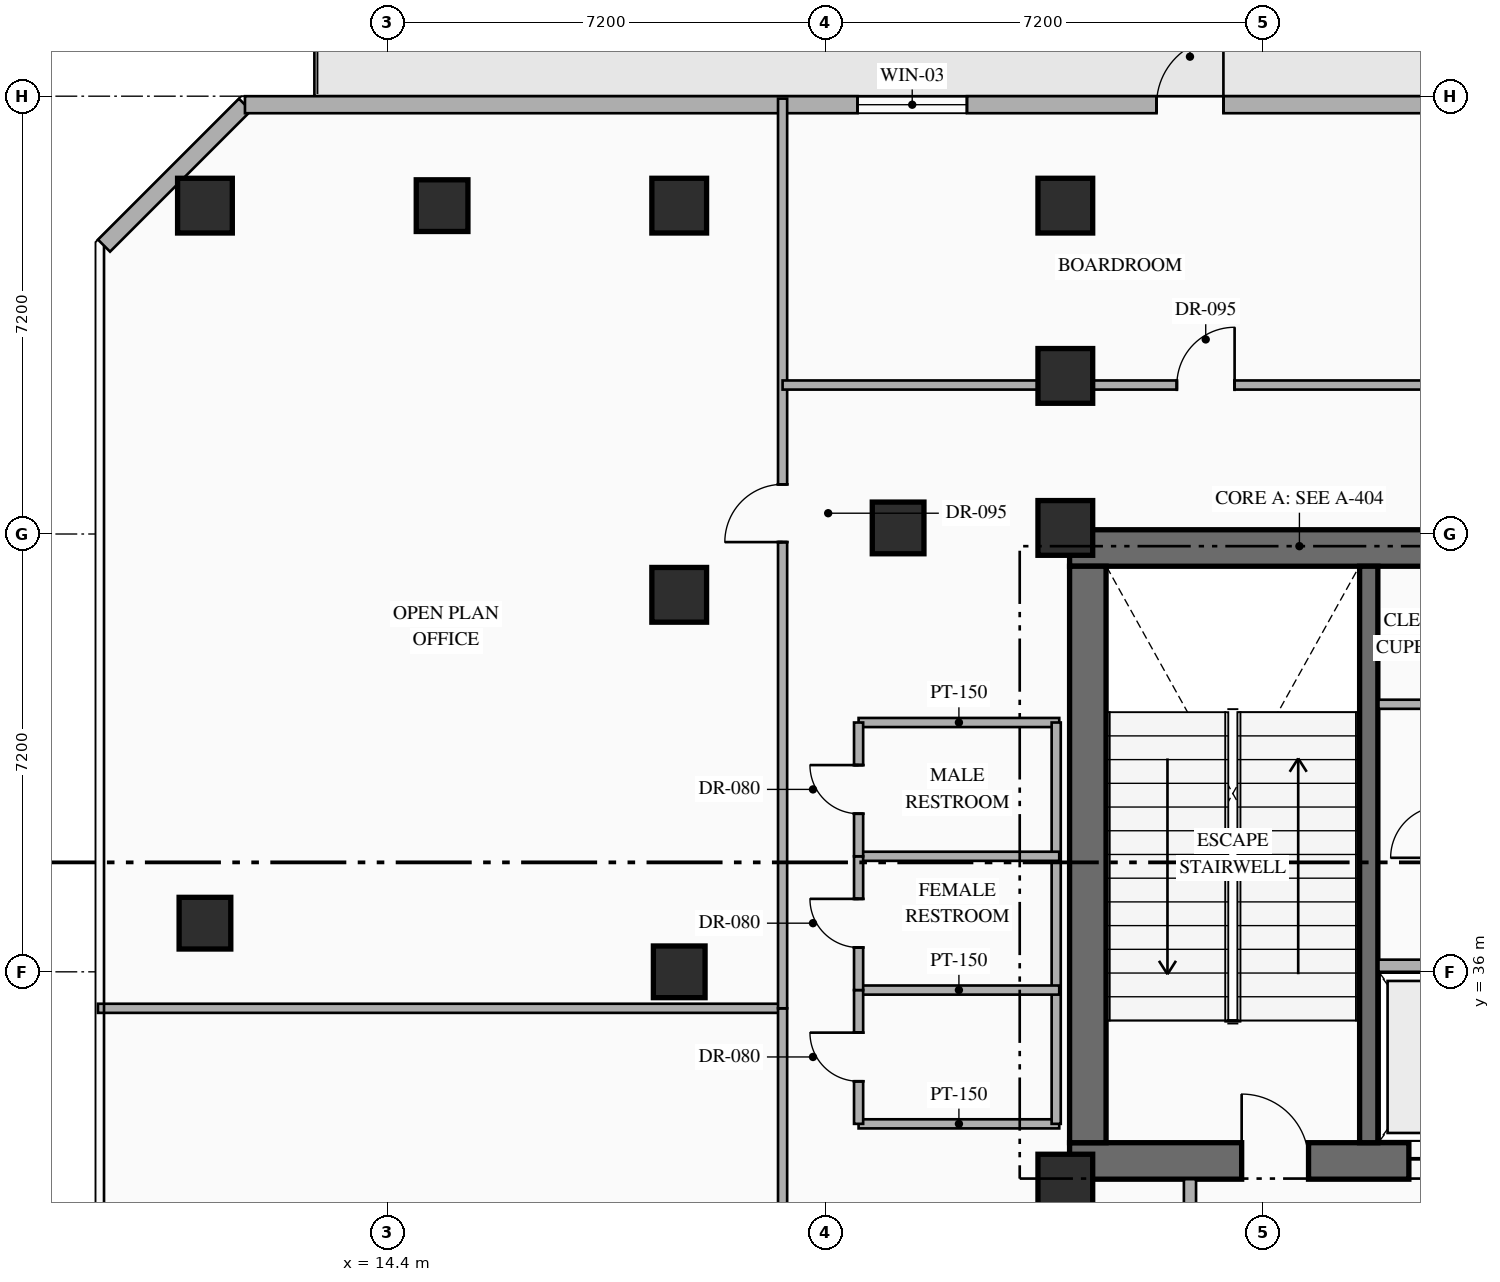
"""IFC4 building model, lengths in metres.
Left out: names, types, materials, properties, quantities, classifications, styles, units other than length and angle.
Written with IfcOpenShell. Run it as: python <this file> out.ifc"""

import sys

from ifc_helpers import new_model, si_unit, direction, frame, frame_2d, origin, origin_2d, place, context, subcontext, project, spatial, rectangle, hollow_rectangle, extrude, element, fill, save


model = new_model("IFC4")
c1 = context("Model", 3, precision=1e-05, world=origin(), true_north=direction((0.0, 1.0)))
c2 = subcontext(c1, "Body", "Model", "MODEL_VIEW")
j1 = project(units=[si_unit("LENGTHUNIT", "METRE"), si_unit("PLANEANGLEUNIT", "RADIAN")], contexts=[c1])
p1 = place(None, origin())
s1 = spatial("IfcSite", under=j1, at=p1, CompositionType="ELEMENT")
p2 = place(p1, origin())
s2 = spatial("IfcBuilding", under=s1, at=p2, CompositionType="ELEMENT")
p3 = place(p2, frame((0.0, 0.0, 96.45)))
s3 = spatial("IfcBuildingStorey", under=s2, at=p3, CompositionType="ELEMENT", Elevation=96.45)
p4 = place(p3, frame((25.62, 32.89, 0.0), z_axis=(0.0, 0.0, 1.0), x_axis=(1.0, 0.0, 0.0)))
e1 = element("IfcWall", 1, at=p4, inside=s3, PredefinedType="SHEAR", context=c2, shape_type="SweptSolid", body=[
    extrude(rectangle(XDim=7.78, YDim=0.6, at=frame_2d((3.89, 0.0))), origin(), (0.0, 0.0, 1.0), 4.8),
])
p5 = place(p4, frame((2.83, 0.0, 0.0)))
e2 = element("IfcOpeningElement", 2, at=p5, cuts=e1, PredefinedType="OPENING", context=c2, shape_type="SweptSolid", body=[
    extrude(rectangle(XDim=1.1, YDim=2.2, at=frame_2d((0.55, 1.1))), frame((0.0, 0.31, 0.0), z_axis=(0.0, -1.0, 0.0), x_axis=(1.0, 0.0, 0.0)), (0.0, 0.0, 1.0), 0.62),
])
p6 = place(p4, frame((5.58, 0.0, 0.0)))
e3 = element("IfcOpeningElement", 3, at=p6, cuts=e1, PredefinedType="OPENING", context=c2, shape_type="SweptSolid", body=[
    extrude(rectangle(XDim=1.1, YDim=2.15, at=frame_2d((0.55, 1.075))), frame((0.0, 0.31, 0.0), z_axis=(0.0, -1.0, 0.0), x_axis=(1.0, 0.0, 0.0)), (0.0, 0.0, 1.0), 0.62),
])
p7 = place(p3, frame((25.62, 42.97, 0.0), z_axis=(0.0, 0.0, 1.0), x_axis=(1.0, 0.0, 0.0)))
e4 = element("IfcWall", 4, at=p7, inside=s3, PredefinedType="SHEAR", context=c2, shape_type="SweptSolid", body=[
    extrude(rectangle(XDim=7.78, YDim=0.6, at=frame_2d((3.89, 0.0))), origin(), (0.0, 0.0, 1.0), 4.8),
])
p8 = place(p3, frame((25.92, 33.19, 0.0), z_axis=(0.0, 0.0, 1.0), x_axis=(0.0, 1.0, 0.0)))
e5 = element("IfcWall", 5, at=p8, inside=s3, PredefinedType="SHEAR", context=c2, shape_type="SweptSolid", body=[
    extrude(rectangle(XDim=9.48, YDim=0.6, at=frame_2d((4.74, 0.0))), origin(), (0.0, 0.0, 1.0), 4.8),
])
p9 = place(p3, frame((30.54, 33.19, 0.0), z_axis=(0.0, 0.0, 1.0), x_axis=(0.0, 1.0, 0.0)))
e6 = element("IfcWall", 6, at=p9, inside=s3, PredefinedType="SHEAR", context=c2, shape_type="SweptSolid", body=[
    extrude(rectangle(XDim=9.48, YDim=0.3, at=frame_2d((4.74, 0.0))), origin(), (0.0, 0.0, 1.0), 4.8),
])
for number, where, z_axis, x_axis in (
    (7, (25.55, 32.55, 0.0), (0.0, 0.0, 1.0), (1.0, 0.0, 0.0)),
    (8, (25.55, 43.3, 0.0), (0.0, 0.0, 1.0), (1.0, 0.0, 0.0)),
):
    element("IfcColumn", number, at=place(p3, frame(where, z_axis=z_axis, x_axis=x_axis)), inside=s3, PredefinedType="COLUMN", context=c2, shape_type="SweptSolid", body=[
        extrude(rectangle(XDim=0.9, YDim=0.9, at=origin_2d()), origin(), (0.0, 0.0, 1.0), 4.8),
    ])
for number, where, z_axis, x_axis in (
    (9, (25.55, 45.8, 0.0), (0.0, 0.0, 1.0), (1.0, 0.0, 0.0)),
    (10, (11.4, 48.6, 0.0), (0.0, 0.0, 1.0), (1.0, 0.0, 0.0)),
    (11, (19.2, 48.6, 0.0), (0.0, 0.0, 1.0), (1.0, 0.0, 0.0)),
    (12, (25.55, 48.6, 0.0), (0.0, 0.0, 1.0), (1.0, 0.0, 0.0)),
    (13, (19.2, 42.2, 0.0), (0.0, 0.0, 1.0), (1.0, 0.0, 0.0)),
):
    element("IfcColumn", number, at=place(p3, frame(where, z_axis=z_axis, x_axis=x_axis)), inside=s3, PredefinedType="COLUMN", context=c2, shape_type="SweptSolid", body=[
        extrude(hollow_rectangle(XDim=0.9, YDim=0.9, WallThickness=0.036, at=origin_2d()), origin(), (0.0, 0.0, 1.0), 4.8),
    ])
for number, where, z_axis, x_axis in (
    (14, (22.8, 43.3, 0.0), (0.0, 0.0, 1.0), (1.0, 0.0, 0.0)),
    (15, (11.4, 36.8, 0.0), (0.0, 0.0, 1.0), (1.0, 0.0, 0.0)),
    (16, (19.2, 36.0, 0.0), (0.0, 0.0, 1.0), (1.0, 0.0, 0.0)),
    (17, (15.3, 48.6, 0.0), (0.0, 0.0, 1.0), (1.0, 0.0, 0.0)),
):
    element("IfcColumn", number, at=place(p3, frame(where, z_axis=z_axis, x_axis=x_axis)), inside=s3, PredefinedType="COLUMN", context=c2, shape_type="SweptSolid", body=[
        extrude(hollow_rectangle(XDim=0.85, YDim=0.85, WallThickness=0.032, at=origin_2d()), origin(), (0.0, 0.0, 1.0), 4.8),
    ])
p10 = place(p3, frame((9.74, 47.942, 0.0), z_axis=(0.0, 0.0, 1.0), x_axis=(0.707106781187, 0.707106781187, 0.0)))
e18 = element("IfcWall", 18, at=p10, inside=s3, PredefinedType="STANDARD", context=c2, shape_type="SweptSolid", body=[
    extrude(rectangle(XDim=3.278, YDim=0.28, at=frame_2d((1.639, 0.0))), origin(), (0.0, 0.0, 1.0), 4.55),
])
p11 = place(p3, frame((12.058, 50.26, 0.0), z_axis=(0.0, 0.0, 1.0), x_axis=(1.0, 0.0, 0.0)))
e19 = element("IfcWall", 19, at=p11, inside=s3, PredefinedType="STANDARD", context=c2, shape_type="SweptSolid", body=[
    extrude(rectangle(XDim=30.484, YDim=0.28, at=frame_2d((15.242, 0.0))), origin(), (0.0, 0.0, 1.0), 4.55),
])
p12 = place(p11, frame((14.992, 0.0, 0.0)))
e20 = element("IfcOpeningElement", 20, at=p12, cuts=e19, PredefinedType="OPENING", context=c2, shape_type="SweptSolid", body=[
    extrude(rectangle(XDim=1.1, YDim=2.2, at=frame_2d((0.55, 1.1))), frame((0.0, 0.15, 0.0), z_axis=(0.0, -1.0, 0.0), x_axis=(1.0, 0.0, 0.0)), (0.0, 0.0, 1.0), 0.3),
])
p13 = place(p11, frame((10.074, 0.0, 0.85)))
e21 = element("IfcOpeningElement", 21, at=p13, cuts=e19, PredefinedType="OPENING", context=c2, shape_type="SweptSolid", body=[
    extrude(rectangle(XDim=1.8, YDim=2.1, at=frame_2d((0.9, 1.05))), frame((0.0, 0.15, 0.0), z_axis=(0.0, -1.0, 0.0), x_axis=(1.0, 0.0, 0.0)), (0.0, 0.0, 1.0), 0.3),
])
p14 = place(p3, frame((30.7, 36.1, 0.0), z_axis=(0.0, 0.0, 1.0), x_axis=(1.0, 0.0, 0.0)))
e22 = element("IfcWall", 22, at=p14, inside=s3, PredefinedType="STANDARD", context=c2, shape_type="SweptSolid", body=[
    extrude(rectangle(XDim=2.1, YDim=0.2, at=frame_2d((1.05, 0.0))), origin(), (0.0, 0.0, 1.0), 4.55),
])
p15 = place(p3, frame((30.7, 40.4, 0.0), z_axis=(0.0, 0.0, 1.0), x_axis=(1.0, 0.0, 0.0)))
e23 = element("IfcWall", 23, at=p15, inside=s3, PredefinedType="PARTITIONING", context=c2, shape_type="SweptSolid", body=[
    extrude(rectangle(XDim=2.1, YDim=0.15, at=frame_2d((1.05, 0.0))), origin(), (0.0, 0.0, 1.0), 4.55),
])
p16 = place(p3, frame((27.6, 29.2, 0.0), z_axis=(0.0, 0.0, 1.0), x_axis=(0.0, 1.0, 0.0)))
e24 = element("IfcWall", 24, at=p16, inside=s3, PredefinedType="STANDARD", context=c2, shape_type="SweptSolid", body=[
    extrude(rectangle(XDim=3.39, YDim=0.2, at=frame_2d((1.695, 0.0))), origin(), (0.0, 0.0, 1.0), 4.55),
])
for number, where, z_axis, x_axis in (
    (25, (22.15, 33.5, 0.0), (0.0, 0.0, 1.0), (1.0, 0.0, 0.0)),
    (26, (22.15, 40.1, 0.0), (0.0, 0.0, 1.0), (1.0, 0.0, 0.0)),
):
    element("IfcWall", number, at=place(p3, frame(where, z_axis=z_axis, x_axis=x_axis)), inside=s3, PredefinedType="PARTITIONING", context=c2, shape_type="SweptSolid", body=[
        extrude(rectangle(XDim=3.3, YDim=0.15, at=frame_2d((1.65, 0.0))), origin(), (0.0, 0.0, 1.0), 4.55),
    ])
p17 = place(p3, frame((25.4, 33.5, 0.0), z_axis=(0.0, 0.0, 1.0), x_axis=(0.0, 1.0, 0.0)))
e27 = element("IfcWall", 27, at=p17, inside=s3, PredefinedType="PARTITIONING", context=c2, shape_type="SweptSolid", body=[
    extrude(rectangle(XDim=6.6, YDim=0.15, at=frame_2d((3.3, 0.0))), origin(), (0.0, 0.0, 1.0), 4.55),
])
for number, where, z_axis, x_axis in (
    (28, (22.15, 35.7, 0.0), (0.0, 0.0, 1.0), (1.0, 0.0, 0.0)),
    (29, (22.15, 37.9, 0.0), (0.0, 0.0, 1.0), (1.0, 0.0, 0.0)),
):
    element("IfcWall", number, at=place(p3, frame(where, z_axis=z_axis, x_axis=x_axis)), inside=s3, PredefinedType="PARTITIONING", context=c2, shape_type="SweptSolid", body=[
        extrude(rectangle(XDim=3.3, YDim=0.15, at=frame_2d((1.65, 0.0))), origin(), (0.0, 0.0, 1.0), 4.55),
    ])
p18 = place(p3, frame((22.15, 33.5, 0.0), z_axis=(0.0, 0.0, 1.0), x_axis=(0.0, 1.0, 0.0)))
e30 = element("IfcWall", 30, at=p18, inside=s3, PredefinedType="PARTITIONING", context=c2, shape_type="SweptSolid", body=[
    extrude(rectangle(XDim=2.2, YDim=0.15, at=frame_2d((1.1, 0.0))), origin(), (0.0, 0.0, 1.0), 4.55),
])
p19 = place(p18, frame((0.7, 0.0, 0.0)))
e31 = element("IfcOpeningElement", 31, at=p19, cuts=e30, PredefinedType="OPENING", context=c2, shape_type="SweptSolid", body=[
    extrude(rectangle(XDim=0.8, YDim=2.06, at=frame_2d((0.4, 1.03))), frame((0.0, 0.085, 0.0), z_axis=(0.0, -1.0, 0.0), x_axis=(1.0, 0.0, 0.0)), (0.0, 0.0, 1.0), 0.17),
])
p20 = place(p3, frame((22.15, 35.7, 0.0), z_axis=(0.0, 0.0, 1.0), x_axis=(0.0, 1.0, 0.0)))
e32 = element("IfcWall", 32, at=p20, inside=s3, PredefinedType="PARTITIONING", context=c2, shape_type="SweptSolid", body=[
    extrude(rectangle(XDim=2.2, YDim=0.15, at=frame_2d((1.1, 0.0))), origin(), (0.0, 0.0, 1.0), 4.55),
])
p21 = place(p20, frame((0.7, 0.0, 0.0)))
e33 = element("IfcOpeningElement", 33, at=p21, cuts=e32, PredefinedType="OPENING", context=c2, shape_type="SweptSolid", body=[
    extrude(rectangle(XDim=0.8, YDim=2.06, at=frame_2d((0.4, 1.03))), frame((0.0, 0.085, 0.0), z_axis=(0.0, -1.0, 0.0), x_axis=(1.0, 0.0, 0.0)), (0.0, 0.0, 1.0), 0.17),
])
p22 = place(p3, frame((22.15, 37.9, 0.0), z_axis=(0.0, 0.0, 1.0), x_axis=(0.0, 1.0, 0.0)))
e34 = element("IfcWall", 34, at=p22, inside=s3, PredefinedType="PARTITIONING", context=c2, shape_type="SweptSolid", body=[
    extrude(rectangle(XDim=2.2, YDim=0.15, at=frame_2d((1.1, 0.0))), origin(), (0.0, 0.0, 1.0), 4.55),
])
p23 = place(p22, frame((0.7, 0.0, 0.0)))
e35 = element("IfcOpeningElement", 35, at=p23, cuts=e34, PredefinedType="OPENING", context=c2, shape_type="SweptSolid", body=[
    extrude(rectangle(XDim=0.8, YDim=2.06, at=frame_2d((0.4, 1.03))), frame((0.0, 0.085, 0.0), z_axis=(0.0, -1.0, 0.0), x_axis=(1.0, 0.0, 0.0)), (0.0, 0.0, 1.0), 0.17),
])
p24 = place(p3, frame((9.64, 35.4, 0.0), z_axis=(0.0, 0.0, 1.0), x_axis=(1.0, 0.0, 0.0)))
e36 = element("IfcWall", 36, at=p24, inside=s3, PredefinedType="PARTITIONING", context=c2, shape_type="SweptSolid", body=[
    extrude(rectangle(XDim=11.26, YDim=0.15, at=frame_2d((5.63, 0.0))), origin(), (0.0, 0.0, 1.0), 4.55),
])
p25 = place(p3, frame((20.9, 23.44, 0.0), z_axis=(0.0, 0.0, 1.0), x_axis=(0.0, 1.0, 0.0)))
e37 = element("IfcWall", 37, at=p25, inside=s3, PredefinedType="PARTITIONING", context=c2, shape_type="SweptSolid", body=[
    extrude(rectangle(XDim=11.96, YDim=0.15, at=frame_2d((5.98, 0.0))), origin(), (0.0, 0.0, 1.0), 4.55),
])
p26 = place(p25, frame((4.48, 0.0, 0.0)))
e38 = element("IfcOpeningElement", 38, at=p26, cuts=e37, PredefinedType="OPENING", context=c2, shape_type="SweptSolid", body=[
    extrude(rectangle(XDim=0.95, YDim=2.15, at=frame_2d((0.475, 1.075))), frame((0.0, 0.085, 0.0), z_axis=(0.0, -1.0, 0.0), x_axis=(1.0, 0.0, 0.0)), (0.0, 0.0, 1.0), 0.17),
])
p27 = place(p3, frame((20.9, 35.4, 0.0), z_axis=(0.0, 0.0, 1.0), x_axis=(0.0, 1.0, 0.0)))
e39 = element("IfcWall", 39, at=p27, inside=s3, PredefinedType="PARTITIONING", context=c2, shape_type="SweptSolid", body=[
    extrude(rectangle(XDim=14.96, YDim=0.15, at=frame_2d((7.48, 0.0))), origin(), (0.0, 0.0, 1.0), 4.55),
])
p28 = place(p27, frame((7.667, 0.0, 0.0)))
e40 = element("IfcOpeningElement", 40, at=p28, cuts=e39, PredefinedType="OPENING", context=c2, shape_type="SweptSolid", body=[
    extrude(rectangle(XDim=0.95, YDim=2.15, at=frame_2d((0.475, 1.075))), frame((0.0, 0.085, 0.0), z_axis=(0.0, -1.0, 0.0), x_axis=(1.0, 0.0, 0.0)), (0.0, 0.0, 1.0), 0.17),
])
p29 = place(p3, frame((20.9, 45.65, 0.0), z_axis=(0.0, 0.0, 1.0), x_axis=(1.0, 0.0, 0.0)))
e41 = element("IfcWall", 41, at=p29, inside=s3, PredefinedType="PARTITIONING", context=c2, shape_type="SweptSolid", body=[
    extrude(rectangle(XDim=11.1, YDim=0.15, at=frame_2d((5.55, 0.0))), origin(), (0.0, 0.0, 1.0), 3.745),
])
p30 = place(p29, frame((6.484, 0.0, 0.0)))
e42 = element("IfcOpeningElement", 42, at=p30, cuts=e41, PredefinedType="OPENING", context=c2, shape_type="SweptSolid", body=[
    extrude(rectangle(XDim=0.95, YDim=2.15, at=frame_2d((0.475, 1.075))), frame((0.0, 0.085, 0.0), z_axis=(0.0, -1.0, 0.0), x_axis=(1.0, 0.0, 0.0)), (0.0, 0.0, 1.0), 0.17),
])
p31 = place(p12, origin())
e43 = element("IfcDoor", 43, at=p31, inside=s3, OperationType="SINGLE_SWING_RIGHT", PredefinedType="DOOR", context=c2, shape_type="SweptSolid", body=[
    extrude(rectangle(XDim=1.1, YDim=2.2, at=frame_2d((0.55, 1.1))), frame((0.0, 0.025, 0.0), z_axis=(0.0, -1.0, 0.0), x_axis=(1.0, 0.0, 0.0)), (0.0, 0.0, 1.0), 0.05),
])
fill(e20, e43)
p32 = place(p13, origin())
e44 = element("IfcWindow", 44, at=p32, inside=s3, PartitioningType="SINGLE_PANEL", PredefinedType="WINDOW", context=c2, shape_type="SweptSolid", body=[
    extrude(rectangle(XDim=1.8, YDim=2.1, at=frame_2d((0.9, 1.05))), frame((0.0, 0.03, 0.0), z_axis=(0.0, -1.0, 0.0), x_axis=(1.0, 0.0, 0.0)), (0.0, 0.0, 1.0), 0.06),
])
fill(e21, e44)
p33 = place(p5, origin())
e45 = element("IfcDoor", 45, at=p33, inside=s3, OperationType="SINGLE_SWING_LEFT", PredefinedType="DOOR", context=c2, shape_type="SweptSolid", body=[
    extrude(rectangle(XDim=1.1, YDim=2.2, at=frame_2d((0.55, 1.1))), frame((0.0, 0.025, 0.0), z_axis=(0.0, -1.0, 0.0), x_axis=(1.0, 0.0, 0.0)), (0.0, 0.0, 1.0), 0.05),
])
fill(e2, e45)
p34 = place(p6, origin())
e46 = element("IfcDoor", 46, at=p34, inside=s3, OperationType="SLIDING_TO_LEFT", PredefinedType="USERDEFINED", context=c2, shape_type="SweptSolid", body=[
    extrude(rectangle(XDim=1.1, YDim=2.15, at=frame_2d((0.55, 1.075))), frame((0.0, 0.025, 0.0), z_axis=(0.0, -1.0, 0.0), x_axis=(1.0, 0.0, 0.0)), (0.0, 0.0, 1.0), 0.05),
])
fill(e3, e46)
p35 = place(p19, origin())
e47 = element("IfcDoor", 47, at=p35, inside=s3, OperationType="SINGLE_SWING_RIGHT", PredefinedType="DOOR", context=c2, shape_type="SweptSolid", body=[
    extrude(rectangle(XDim=0.8, YDim=2.06, at=frame_2d((0.4, 1.03))), frame((0.0, 0.025, 0.0), z_axis=(0.0, -1.0, 0.0), x_axis=(1.0, 0.0, 0.0)), (0.0, 0.0, 1.0), 0.05),
])
fill(e31, e47)
p36 = place(p21, origin())
e48 = element("IfcDoor", 48, at=p36, inside=s3, OperationType="SINGLE_SWING_RIGHT", PredefinedType="DOOR", context=c2, shape_type="SweptSolid", body=[
    extrude(rectangle(XDim=0.8, YDim=2.06, at=frame_2d((0.4, 1.03))), frame((0.0, 0.025, 0.0), z_axis=(0.0, -1.0, 0.0), x_axis=(1.0, 0.0, 0.0)), (0.0, 0.0, 1.0), 0.05),
])
fill(e33, e48)
p37 = place(p23, origin())
e49 = element("IfcDoor", 49, at=p37, inside=s3, OperationType="SINGLE_SWING_RIGHT", PredefinedType="DOOR", context=c2, shape_type="SweptSolid", body=[
    extrude(rectangle(XDim=0.8, YDim=2.06, at=frame_2d((0.4, 1.03))), frame((0.0, 0.025, 0.0), z_axis=(0.0, -1.0, 0.0), x_axis=(1.0, 0.0, 0.0)), (0.0, 0.0, 1.0), 0.05),
])
fill(e35, e49)
p38 = place(p28, origin())
e50 = element("IfcDoor", 50, at=p38, inside=s3, OperationType="SINGLE_SWING_LEFT", PredefinedType="DOOR", context=c2, shape_type="SweptSolid", body=[
    extrude(rectangle(XDim=0.95, YDim=2.15, at=frame_2d((0.475, 1.075))), frame((0.0, 0.025, 0.0), z_axis=(0.0, -1.0, 0.0), x_axis=(1.0, 0.0, 0.0)), (0.0, 0.0, 1.0), 0.05),
])
fill(e40, e50)
p39 = place(p30, origin())
e51 = element("IfcDoor", 51, at=p39, inside=s3, OperationType="SINGLE_SWING_RIGHT", PredefinedType="DOOR", context=c2, shape_type="SweptSolid", body=[
    extrude(rectangle(XDim=0.95, YDim=2.15, at=frame_2d((0.475, 1.075))), frame((0.0, 0.025, 0.0), z_axis=(0.0, -1.0, 0.0), x_axis=(1.0, 0.0, 0.0)), (0.0, 0.0, 1.0), 0.05),
])
fill(e42, e51)
save(model, sys.argv[1])
